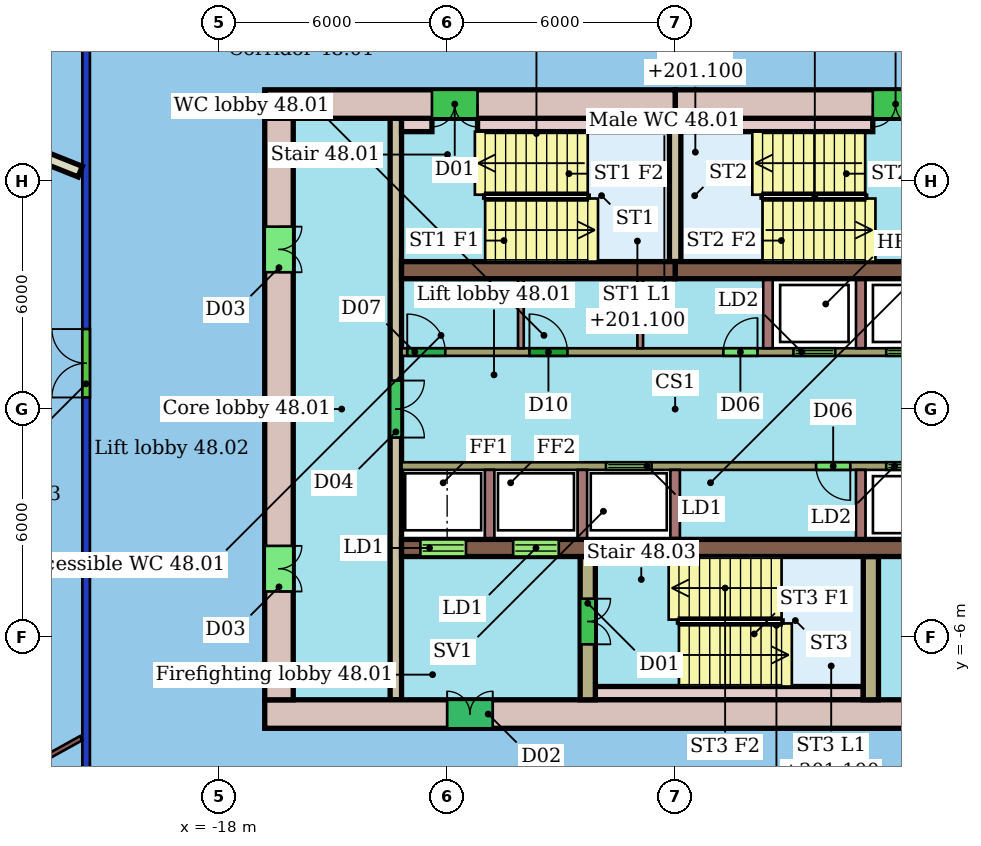
"""IFC4 building model, lengths in metres.
Left out: names, types, materials, properties, quantities, classifications, styles, units other than length and angle.
Written with IfcOpenShell. Run it as: python <this file> out.ifc"""

import sys

from ifc_helpers import new_model, si_unit, direction, frame, frame_2d, origin, place, context, subcontext, project, spatial, rectangle, extrude, element, fill, save


model = new_model("IFC4")
c1 = context("Model", 3, precision=1e-05, world=origin(), true_north=direction((0.0, 1.0)))
c2 = subcontext(c1, "Body", "Model", "MODEL_VIEW")
j1 = project(units=[si_unit("LENGTHUNIT", "METRE"), si_unit("PLANEANGLEUNIT", "RADIAN")], contexts=[c1])
p1 = place(None, origin())
s1 = spatial("IfcSite", under=j1, at=p1, CompositionType="ELEMENT")
p2 = place(p1, origin())
s2 = spatial("IfcBuilding", under=s1, at=p2, CompositionType="ELEMENT")
p3 = place(p2, frame((0.0, 0.0, 199.3)))
s3 = spatial("IfcBuildingStorey", under=s2, at=p3, CompositionType="ELEMENT", Elevation=199.3)
p4 = place(p3, frame((-21.5, -10.4, 0.0), z_axis=(0.0, 0.0, 1.0), x_axis=(0.0, 1.0, 0.0)))
e1 = element("IfcWall", 1, at=p4, inside=s3, PredefinedType="PARTITIONING", context=c2, shape_type="SweptSolid", body=[
    extrude(rectangle(XDim=20.8, YDim=0.2, at=frame_2d((10.4, 0.0))), origin(), (0.0, 0.0, 1.0), 3.05),
])
p5 = place(p4, frame((10.705, 0.0, 0.0)))
e2 = element("IfcOpeningElement", 2, at=p5, cuts=e1, PredefinedType="OPENING", context=c2, shape_type="SweptSolid", body=[
    extrude(rectangle(XDim=1.8, YDim=2.4, at=frame_2d((0.9, 1.2))), frame((0.0, 0.11, 0.0), z_axis=(0.0, -1.0, 0.0), x_axis=(1.0, 0.0, 0.0)), (0.0, 0.0, 1.0), 0.22),
])
p6 = place(p3, frame((-27.328, 8.511, 0.0), z_axis=(0.0, 0.0, 1.0), x_axis=(0.928768643744, -0.370659960608, 0.0)))
e3 = element("IfcWall", 3, at=p6, inside=s3, PredefinedType="PARTITIONING", context=c2, shape_type="SweptSolid", body=[
    extrude(rectangle(XDim=6.107, YDim=0.3, at=frame_2d((3.054, 0.0))), origin(), (0.0, 0.0, 1.0), 3.45),
])
p7 = place(p3, frame((-29.476, -13.006, 0.0), z_axis=(0.0, 0.0, 1.0), x_axis=(0.874733135583, 0.484604933439, 0.0)))
e4 = element("IfcWall", 4, at=p7, inside=s3, PredefinedType="PARTITIONING", context=c2, shape_type="SweptSolid", body=[
    extrude(rectangle(XDim=8.969, YDim=0.125, at=frame_2d((4.485, 0.0))), origin(), (0.0, 0.0, 1.0), 3.45),
])
p8 = place(p3, frame((4.8, 8.025, 0.0), z_axis=(0.0, 0.0, 1.0), x_axis=(-1.0, 0.0, 0.0)))
e5 = element("IfcWall", 5, at=p8, inside=s3, PredefinedType="SHEAR", context=c2, shape_type="SweptSolid", body=[
    extrude(rectangle(XDim=10.8, YDim=0.75, at=frame_2d((5.4, 0.0))), origin(), (0.0, 0.0, 1.0), 3.3),
])
p9 = place(p8, frame((4.4, 0.0, 0.0)))
e6 = element("IfcOpeningElement", 6, at=p9, cuts=e5, PredefinedType="OPENING", context=c2, shape_type="SweptSolid", body=[
    extrude(rectangle(XDim=1.2, YDim=2.1, at=frame_2d((0.6, 1.05))), frame((0.0, 0.385, 0.0), z_axis=(0.0, -1.0, 0.0), x_axis=(1.0, 0.0, 0.0)), (0.0, 0.0, 1.0), 0.77),
])
p10 = place(p3, frame((-6.0, 8.025, 0.0), z_axis=(0.0, 0.0, 1.0), x_axis=(-1.0, 0.0, 0.0)))
e7 = element("IfcWall", 7, at=p10, inside=s3, PredefinedType="SHEAR", context=c2, shape_type="SweptSolid", body=[
    extrude(rectangle(XDim=10.8, YDim=0.75, at=frame_2d((5.4, 0.0))), origin(), (0.0, 0.0, 1.0), 3.3),
])
p11 = place(p10, frame((5.2, 0.0, 0.0)))
e8 = element("IfcOpeningElement", 8, at=p11, cuts=e7, PredefinedType="OPENING", context=c2, shape_type="SweptSolid", body=[
    extrude(rectangle(XDim=1.2, YDim=2.1, at=frame_2d((0.6, 1.05))), frame((0.0, 0.385, 0.0), z_axis=(0.0, -1.0, 0.0), x_axis=(1.0, 0.0, 0.0)), (0.0, 0.0, 1.0), 0.77),
])
p12 = place(p3, frame((-16.8, -8.025, 0.0), z_axis=(0.0, 0.0, 1.0), x_axis=(1.0, 0.0, 0.0)))
e9 = element("IfcWall", 9, at=p12, inside=s3, PredefinedType="SHEAR", context=c2, shape_type="SweptSolid", body=[
    extrude(rectangle(XDim=21.6, YDim=0.75, at=frame_2d((10.8, 0.0))), origin(), (0.0, 0.0, 1.0), 3.3),
])
p13 = place(p12, frame((4.8, 0.0, 0.0)))
e10 = element("IfcOpeningElement", 10, at=p13, cuts=e9, PredefinedType="OPENING", context=c2, shape_type="SweptSolid", body=[
    extrude(rectangle(XDim=1.2, YDim=2.1, at=frame_2d((0.6, 1.05))), frame((0.0, 0.385, 0.0), z_axis=(0.0, -1.0, 0.0), x_axis=(1.0, 0.0, 0.0)), (0.0, 0.0, 1.0), 0.77),
])
p14 = place(p3, frame((-16.425, 7.65, 0.0), z_axis=(0.0, 0.0, 1.0), x_axis=(0.0, -1.0, 0.0)))
e11 = element("IfcWall", 11, at=p14, inside=s3, PredefinedType="SHEAR", context=c2, shape_type="SweptSolid", body=[
    extrude(rectangle(XDim=15.3, YDim=0.75, at=frame_2d((7.65, 0.0))), origin(), (0.0, 0.0, 1.0), 3.3),
])
p15 = place(p14, frame((11.25, 0.0, 0.0)))
e12 = element("IfcOpeningElement", 12, at=p15, cuts=e11, PredefinedType="OPENING", context=c2, shape_type="SweptSolid", body=[
    extrude(rectangle(XDim=1.2, YDim=2.1, at=frame_2d((0.6, 1.05))), frame((0.0, 0.385, 0.0), z_axis=(0.0, -1.0, 0.0), x_axis=(1.0, 0.0, 0.0)), (0.0, 0.0, 1.0), 0.77),
])
p16 = place(p14, frame((2.85, 0.0, 0.0)))
e13 = element("IfcOpeningElement", 13, at=p16, cuts=e11, PredefinedType="OPENING", context=c2, shape_type="SweptSolid", body=[
    extrude(rectangle(XDim=1.2, YDim=2.1, at=frame_2d((0.6, 1.05))), frame((0.0, 0.385, 0.0), z_axis=(0.0, -1.0, 0.0), x_axis=(1.0, 0.0, 0.0)), (0.0, 0.0, 1.0), 0.77),
])
for number, where, z_axis, x_axis in (
    (14, (-13.2, 3.655, 0.0), (0.0, 0.0, 1.0), (1.0, 0.0, 0.0)),
    (15, (-6.0, 3.655, 0.0), (0.0, 0.0, 1.0), (1.0, 0.0, 0.0)),
):
    element("IfcWall", number, at=place(p3, frame(where, z_axis=z_axis, x_axis=x_axis)), inside=s3, PredefinedType="SHEAR", context=c2, shape_type="SweptSolid", body=[
        extrude(rectangle(XDim=7.2, YDim=0.45, at=frame_2d((3.6, 0.0))), origin(), (0.0, 0.0, 1.0), 3.3),
    ])
p17 = place(p3, frame((-13.2, -3.655, 0.0), z_axis=(0.0, 0.0, 1.0), x_axis=(1.0, 0.0, 0.0)))
e16 = element("IfcWall", 16, at=p17, inside=s3, PredefinedType="SHEAR", context=c2, shape_type="SweptSolid", body=[
    extrude(rectangle(XDim=7.2, YDim=0.45, at=frame_2d((3.6, 0.0))), origin(), (0.0, 0.0, 1.0), 3.3),
])
p18 = place(p17, frame((0.496, 0.0, 0.0)))
e17 = element("IfcOpeningElement", 17, at=p18, cuts=e16, PredefinedType="OPENING", context=c2, shape_type="SweptSolid", body=[
    extrude(rectangle(XDim=1.2, YDim=2.1, at=frame_2d((0.6, 1.05))), frame((0.0, 0.235, 0.0), z_axis=(0.0, -1.0, 0.0), x_axis=(1.0, 0.0, 0.0)), (0.0, 0.0, 1.0), 0.47),
])
p19 = place(p17, frame((2.938, 0.0, 0.0)))
e18 = element("IfcOpeningElement", 18, at=p19, cuts=e16, PredefinedType="OPENING", context=c2, shape_type="SweptSolid", body=[
    extrude(rectangle(XDim=1.2, YDim=2.1, at=frame_2d((0.6, 1.05))), frame((0.0, 0.235, 0.0), z_axis=(0.0, -1.0, 0.0), x_axis=(1.0, 0.0, 0.0)), (0.0, 0.0, 1.0), 0.47),
])
p20 = place(p3, frame((-6.0, -3.655, 0.0), z_axis=(0.0, 0.0, 1.0), x_axis=(1.0, 0.0, 0.0)))
e19 = element("IfcWall", 19, at=p20, inside=s3, PredefinedType="SHEAR", context=c2, shape_type="SweptSolid", body=[
    extrude(rectangle(XDim=7.2, YDim=0.45, at=frame_2d((3.6, 0.0))), origin(), (0.0, 0.0, 1.0), 3.3),
])
p21 = place(p3, frame((-13.35, 7.65, 0.0), z_axis=(0.0, 0.0, 1.0), x_axis=(0.0, -1.0, 0.0)))
e20 = element("IfcWall", 20, at=p21, inside=s3, PredefinedType="SHEAR", context=c2, shape_type="SweptSolid", body=[
    extrude(rectangle(XDim=15.3, YDim=0.3, at=frame_2d((7.65, 0.0))), origin(), (0.0, 0.0, 1.0), 3.3),
])
p22 = place(p21, frame((6.9, 0.0, 0.0)))
e21 = element("IfcOpeningElement", 21, at=p22, cuts=e20, PredefinedType="OPENING", context=c2, shape_type="SweptSolid", body=[
    extrude(rectangle(XDim=1.5, YDim=2.1, at=frame_2d((0.75, 1.05))), frame((0.0, 0.16, 0.0), z_axis=(0.0, -1.0, 0.0), x_axis=(1.0, 0.0, 0.0)), (0.0, 0.0, 1.0), 0.32),
])
p23 = place(p3, frame((-13.2, 1.5, 0.0), z_axis=(0.0, 0.0, 1.0), x_axis=(1.0, 0.0, 0.0)))
e22 = element("IfcWall", 22, at=p23, inside=s3, PredefinedType="SHEAR", context=c2, shape_type="SweptSolid", body=[
    extrude(rectangle(XDim=14.4, YDim=0.2, at=frame_2d((7.2, 0.0))), origin(), (0.0, 0.0, 1.0), 3.3),
])
p24 = place(p23, frame((10.312, 0.0, 0.0)))
e23 = element("IfcOpeningElement", 23, at=p24, cuts=e22, PredefinedType="OPENING", context=c2, shape_type="SweptSolid", body=[
    extrude(rectangle(XDim=1.1, YDim=2.1, at=frame_2d((0.55, 1.05))), frame((0.0, 0.11, 0.0), z_axis=(0.0, -1.0, 0.0), x_axis=(1.0, 0.0, 0.0)), (0.0, 0.0, 1.0), 0.22),
])
p25 = place(p23, frame((12.754, 0.0, 0.0)))
e24 = element("IfcOpeningElement", 24, at=p25, cuts=e22, PredefinedType="OPENING", context=c2, shape_type="SweptSolid", body=[
    extrude(rectangle(XDim=1.1, YDim=2.1, at=frame_2d((0.55, 1.05))), frame((0.0, 0.11, 0.0), z_axis=(0.0, -1.0, 0.0), x_axis=(1.0, 0.0, 0.0)), (0.0, 0.0, 1.0), 0.22),
])
p26 = place(p23, frame((0.15, 0.0, 0.0)))
e25 = element("IfcOpeningElement", 25, at=p26, cuts=e22, PredefinedType="OPENING", context=c2, shape_type="SweptSolid", body=[
    extrude(rectangle(XDim=1.0, YDim=2.1, at=frame_2d((0.5, 1.05))), frame((0.0, 0.11, 0.0), z_axis=(0.0, -1.0, 0.0), x_axis=(1.0, 0.0, 0.0)), (0.0, 0.0, 1.0), 0.22),
])
p27 = place(p23, frame((3.365, 0.0, 0.0)))
e26 = element("IfcOpeningElement", 26, at=p27, cuts=e22, PredefinedType="OPENING", context=c2, shape_type="SweptSolid", body=[
    extrude(rectangle(XDim=1.0, YDim=2.1, at=frame_2d((0.5, 1.05))), frame((0.0, 0.11, 0.0), z_axis=(0.0, -1.0, 0.0), x_axis=(1.0, 0.0, 0.0)), (0.0, 0.0, 1.0), 0.22),
])
p28 = place(p23, frame((8.467, 0.0, 0.0)))
e27 = element("IfcOpeningElement", 27, at=p28, cuts=e22, PredefinedType="OPENING", context=c2, shape_type="SweptSolid", body=[
    extrude(rectangle(XDim=0.9, YDim=2.1, at=frame_2d((0.45, 1.05))), frame((0.0, 0.11, 0.0), z_axis=(0.0, -1.0, 0.0), x_axis=(1.0, 0.0, 0.0)), (0.0, 0.0, 1.0), 0.22),
])
p29 = place(p3, frame((1.2, -1.5, 0.0), z_axis=(0.0, 0.0, 1.0), x_axis=(-1.0, 0.0, 0.0)))
e28 = element("IfcWall", 28, at=p29, inside=s3, PredefinedType="SHEAR", context=c2, shape_type="SweptSolid", body=[
    extrude(rectangle(XDim=14.4, YDim=0.2, at=frame_2d((7.2, 0.0))), origin(), (0.0, 0.0, 1.0), 3.3),
])
p30 = place(p29, frame((7.821, 0.0, 0.0)))
e29 = element("IfcOpeningElement", 29, at=p30, cuts=e28, PredefinedType="OPENING", context=c2, shape_type="SweptSolid", body=[
    extrude(rectangle(XDim=1.2, YDim=2.1, at=frame_2d((0.6, 1.05))), frame((0.0, 0.11, 0.0), z_axis=(0.0, -1.0, 0.0), x_axis=(1.0, 0.0, 0.0)), (0.0, 0.0, 1.0), 0.22),
])
p31 = place(p29, frame((0.546, 0.0, 0.0)))
e30 = element("IfcOpeningElement", 30, at=p31, cuts=e28, PredefinedType="OPENING", context=c2, shape_type="SweptSolid", body=[
    extrude(rectangle(XDim=1.1, YDim=2.1, at=frame_2d((0.55, 1.05))), frame((0.0, 0.11, 0.0), z_axis=(0.0, -1.0, 0.0), x_axis=(1.0, 0.0, 0.0)), (0.0, 0.0, 1.0), 0.22),
])
p32 = place(p29, frame((2.592, 0.0, 0.0)))
e31 = element("IfcOpeningElement", 31, at=p32, cuts=e28, PredefinedType="OPENING", context=c2, shape_type="SweptSolid", body=[
    extrude(rectangle(XDim=0.9, YDim=2.1, at=frame_2d((0.45, 1.05))), frame((0.0, 0.11, 0.0), z_axis=(0.0, -1.0, 0.0), x_axis=(1.0, 0.0, 0.0)), (0.0, 0.0, 1.0), 0.22),
])
p33 = place(p3, frame((-8.3, -3.88, 0.0), z_axis=(0.0, 0.0, 1.0), x_axis=(0.0, -1.0, 0.0)))
e32 = element("IfcWall", 32, at=p33, inside=s3, PredefinedType="SHEAR", context=c2, shape_type="SweptSolid", body=[
    extrude(rectangle(XDim=3.77, YDim=0.4, at=frame_2d((1.885, 0.0))), origin(), (0.0, 0.0, 1.0), 3.3),
])
p34 = place(p33, frame((1.11, 0.0, 0.0)))
e33 = element("IfcOpeningElement", 33, at=p34, cuts=e32, PredefinedType="OPENING", context=c2, shape_type="SweptSolid", body=[
    extrude(rectangle(XDim=1.2, YDim=2.1, at=frame_2d((0.6, 1.05))), frame((0.0, 0.21, 0.0), z_axis=(0.0, -1.0, 0.0), x_axis=(1.0, 0.0, 0.0)), (0.0, 0.0, 1.0), 0.42),
])
p35 = place(p3, frame((-0.85, -3.88, 0.0), z_axis=(0.0, 0.0, 1.0), x_axis=(0.0, -1.0, 0.0)))
e34 = element("IfcWall", 34, at=p35, inside=s3, PredefinedType="SHEAR", context=c2, shape_type="SweptSolid", body=[
    extrude(rectangle(XDim=3.77, YDim=0.4, at=frame_2d((1.885, 0.0))), origin(), (0.0, 0.0, 1.0), 3.3),
])
p36 = place(p3, frame((-6.0, 3.88, 0.0), z_axis=(0.0, 0.0, 1.0), x_axis=(0.0, 1.0, 0.0)))
e35 = element("IfcWall", 35, at=p36, inside=s3, PredefinedType="SHEAR", context=c2, shape_type="SweptSolid", body=[
    extrude(rectangle(XDim=3.77, YDim=0.3, at=frame_2d((1.885, 0.0))), origin(), (0.0, 0.0, 1.0), 3.3),
])
p37 = place(p3, frame((-13.2, 7.475, 0.0), z_axis=(0.0, 0.0, 1.0), x_axis=(1.0, 0.0, 0.0)))
e36 = element("IfcWall", 36, at=p37, inside=s3, PredefinedType="SHEAR", context=c2, shape_type="SweptSolid", body=[
    extrude(rectangle(XDim=0.8, YDim=0.35, at=frame_2d((0.4, 0.0))), origin(), (0.0, 0.0, 1.0), 3.3),
])
for number, where, z_axis, x_axis in (
    (37, (-11.2, 7.475, 0.0), (0.0, 0.0, 1.0), (1.0, 0.0, 0.0)),
    (38, (-5.85, 7.475, 0.0), (0.0, 0.0, 1.0), (1.0, 0.0, 0.0)),
):
    element("IfcWall", number, at=place(p3, frame(where, z_axis=z_axis, x_axis=x_axis)), inside=s3, PredefinedType="SHEAR", context=c2, shape_type="SweptSolid", body=[
        extrude(rectangle(XDim=5.05, YDim=0.35, at=frame_2d((2.525, 0.0))), origin(), (0.0, 0.0, 1.0), 3.3),
    ])
p38 = place(p3, frame((-8.1, -7.475, 0.0), z_axis=(0.0, 0.0, 1.0), x_axis=(1.0, 0.0, 0.0)))
e39 = element("IfcWall", 39, at=p38, inside=s3, PredefinedType="SHEAR", context=c2, shape_type="SweptSolid", body=[
    extrude(rectangle(XDim=7.05, YDim=0.35, at=frame_2d((3.525, 0.0))), origin(), (0.0, 0.0, 1.0), 3.3),
])
for number, where, z_axis, x_axis in (
    (40, (-3.558, 1.6, 0.0), (0.0, 0.0, 1.0), (0.0, 1.0, 0.0)),
    (41, (-1.117, 1.6, 0.0), (0.0, 0.0, 1.0), (0.0, 1.0, 0.0)),
):
    element("IfcWall", number, at=place(p3, frame(where, z_axis=z_axis, x_axis=x_axis)), inside=s3, PredefinedType="SHEAR", context=c2, shape_type="SweptSolid", body=[
        extrude(rectangle(XDim=1.83, YDim=0.25, at=frame_2d((0.915, 0.0))), origin(), (0.0, 0.0, 1.0), 3.3),
    ])
for number, where, z_axis, x_axis in (
    (42, (-10.06, 1.6, 0.0), (0.0, 0.0, 1.0), (0.0, 1.0, 0.0)),
    (43, (-6.919, 1.6, 0.0), (0.0, 0.0, 1.0), (0.0, 1.0, 0.0)),
):
    element("IfcWall", number, at=place(p3, frame(where, z_axis=z_axis, x_axis=x_axis)), inside=s3, PredefinedType="PARTITIONING", context=c2, shape_type="SweptSolid", body=[
        extrude(rectangle(XDim=1.83, YDim=0.15, at=frame_2d((0.915, 0.0))), origin(), (0.0, 0.0, 1.0), 3.3),
    ])
for number, where, z_axis, x_axis in (
    (44, (-10.883, -1.6, 0.0), (0.0, 0.0, 1.0), (0.0, -1.0, 0.0)),
    (45, (-8.442, -1.6, 0.0), (0.0, 0.0, 1.0), (0.0, -1.0, 0.0)),
    (46, (-6.0, -1.6, 0.0), (0.0, 0.0, 1.0), (0.0, -1.0, 0.0)),
    (47, (-1.117, -1.6, 0.0), (0.0, 0.0, 1.0), (0.0, -1.0, 0.0)),
):
    element("IfcWall", number, at=place(p3, frame(where, z_axis=z_axis, x_axis=x_axis)), inside=s3, PredefinedType="SHEAR", context=c2, shape_type="SweptSolid", body=[
        extrude(rectangle(XDim=1.83, YDim=0.25, at=frame_2d((0.915, 0.0))), origin(), (0.0, 0.0, 1.0), 3.3),
    ])
p39 = place(p5, origin())
e48 = element("IfcDoor", 48, at=p39, inside=s3, OperationType="DOUBLE_DOOR_SINGLE_SWING", PredefinedType="DOOR", context=c2, shape_type="SweptSolid", body=[
    extrude(rectangle(XDim=1.8, YDim=2.4, at=frame_2d((0.9, 1.2))), frame((0.0, 0.025, 0.0), z_axis=(0.0, -1.0, 0.0), x_axis=(1.0, 0.0, 0.0)), (0.0, 0.0, 1.0), 0.05),
])
fill(e2, e48)
p40 = place(p9, origin())
e49 = element("IfcDoor", 49, at=p40, inside=s3, OperationType="DOUBLE_DOOR_SINGLE_SWING", PredefinedType="NOTDEFINED", context=c2, shape_type="SweptSolid", body=[
    extrude(rectangle(XDim=1.2, YDim=2.1, at=frame_2d((0.6, 1.05))), frame((0.0, 0.025, 0.0), z_axis=(0.0, -1.0, 0.0), x_axis=(1.0, 0.0, 0.0)), (0.0, 0.0, 1.0), 0.05),
])
fill(e6, e49)
p41 = place(p11, origin())
e50 = element("IfcDoor", 50, at=p41, inside=s3, OperationType="DOUBLE_DOOR_SINGLE_SWING", PredefinedType="NOTDEFINED", context=c2, shape_type="SweptSolid", body=[
    extrude(rectangle(XDim=1.2, YDim=2.1, at=frame_2d((0.6, 1.05))), frame((0.0, 0.025, 0.0), z_axis=(0.0, -1.0, 0.0), x_axis=(1.0, 0.0, 0.0)), (0.0, 0.0, 1.0), 0.05),
])
fill(e8, e50)
p42 = place(p13, origin())
e51 = element("IfcDoor", 51, at=p42, inside=s3, OperationType="DOUBLE_DOOR_SINGLE_SWING", PredefinedType="NOTDEFINED", context=c2, shape_type="SweptSolid", body=[
    extrude(rectangle(XDim=1.2, YDim=2.1, at=frame_2d((0.6, 1.05))), frame((0.0, 0.025, 0.0), z_axis=(0.0, -1.0, 0.0), x_axis=(1.0, 0.0, 0.0)), (0.0, 0.0, 1.0), 0.05),
])
fill(e10, e51)
p43 = place(p15, origin())
e52 = element("IfcDoor", 52, at=p43, inside=s3, OperationType="DOUBLE_DOOR_SINGLE_SWING", PredefinedType="NOTDEFINED", context=c2, shape_type="SweptSolid", body=[
    extrude(rectangle(XDim=1.2, YDim=2.1, at=frame_2d((0.6, 1.05))), frame((0.0, 0.025, 0.0), z_axis=(0.0, -1.0, 0.0), x_axis=(1.0, 0.0, 0.0)), (0.0, 0.0, 1.0), 0.05),
])
fill(e12, e52)
p44 = place(p16, origin())
e53 = element("IfcDoor", 53, at=p44, inside=s3, OperationType="DOUBLE_DOOR_SINGLE_SWING", PredefinedType="NOTDEFINED", context=c2, shape_type="SweptSolid", body=[
    extrude(rectangle(XDim=1.2, YDim=2.1, at=frame_2d((0.6, 1.05))), frame((0.0, 0.025, 0.0), z_axis=(0.0, -1.0, 0.0), x_axis=(1.0, 0.0, 0.0)), (0.0, 0.0, 1.0), 0.05),
])
fill(e13, e53)
p45 = place(p18, origin())
e54 = element("IfcDoor", 54, at=p45, inside=s3, OperationType="DOUBLE_DOOR_SLIDING", PredefinedType="NOTDEFINED", context=c2, shape_type="SweptSolid", body=[
    extrude(rectangle(XDim=1.2, YDim=2.1, at=frame_2d((0.6, 1.05))), frame((0.0, 0.025, 0.0), z_axis=(0.0, -1.0, 0.0), x_axis=(1.0, 0.0, 0.0)), (0.0, 0.0, 1.0), 0.05),
])
fill(e17, e54)
p46 = place(p19, origin())
e55 = element("IfcDoor", 55, at=p46, inside=s3, OperationType="DOUBLE_DOOR_SLIDING", PredefinedType="NOTDEFINED", context=c2, shape_type="SweptSolid", body=[
    extrude(rectangle(XDim=1.2, YDim=2.1, at=frame_2d((0.6, 1.05))), frame((0.0, 0.025, 0.0), z_axis=(0.0, -1.0, 0.0), x_axis=(1.0, 0.0, 0.0)), (0.0, 0.0, 1.0), 0.05),
])
fill(e18, e55)
p47 = place(p22, origin())
e56 = element("IfcDoor", 56, at=p47, inside=s3, OperationType="DOUBLE_DOOR_SINGLE_SWING", PredefinedType="NOTDEFINED", context=c2, shape_type="SweptSolid", body=[
    extrude(rectangle(XDim=1.5, YDim=2.1, at=frame_2d((0.75, 1.05))), frame((0.0, 0.025, 0.0), z_axis=(0.0, -1.0, 0.0), x_axis=(1.0, 0.0, 0.0)), (0.0, 0.0, 1.0), 0.05),
])
fill(e21, e56)
p48 = place(p24, origin())
e57 = element("IfcDoor", 57, at=p48, inside=s3, OperationType="DOUBLE_DOOR_SLIDING", PredefinedType="NOTDEFINED", context=c2, shape_type="SweptSolid", body=[
    extrude(rectangle(XDim=1.1, YDim=2.1, at=frame_2d((0.55, 1.05))), frame((0.0, 0.025, 0.0), z_axis=(0.0, -1.0, 0.0), x_axis=(1.0, 0.0, 0.0)), (0.0, 0.0, 1.0), 0.05),
])
fill(e23, e57)
p49 = place(p25, origin())
e58 = element("IfcDoor", 58, at=p49, inside=s3, OperationType="DOUBLE_DOOR_SLIDING", PredefinedType="NOTDEFINED", context=c2, shape_type="SweptSolid", body=[
    extrude(rectangle(XDim=1.1, YDim=2.1, at=frame_2d((0.55, 1.05))), frame((0.0, 0.025, 0.0), z_axis=(0.0, -1.0, 0.0), x_axis=(1.0, 0.0, 0.0)), (0.0, 0.0, 1.0), 0.05),
])
fill(e24, e58)
p50 = place(p26, origin())
e59 = element("IfcDoor", 59, at=p50, inside=s3, OperationType="SINGLE_SWING_LEFT", PredefinedType="NOTDEFINED", context=c2, shape_type="SweptSolid", body=[
    extrude(rectangle(XDim=1.0, YDim=2.1, at=frame_2d((0.5, 1.05))), frame((0.0, 0.025, 0.0), z_axis=(0.0, -1.0, 0.0), x_axis=(1.0, 0.0, 0.0)), (0.0, 0.0, 1.0), 0.05),
])
fill(e25, e59)
p51 = place(p27, origin())
e60 = element("IfcDoor", 60, at=p51, inside=s3, OperationType="SINGLE_SWING_LEFT", PredefinedType="NOTDEFINED", context=c2, shape_type="SweptSolid", body=[
    extrude(rectangle(XDim=1.0, YDim=2.1, at=frame_2d((0.5, 1.05))), frame((0.0, 0.025, 0.0), z_axis=(0.0, -1.0, 0.0), x_axis=(1.0, 0.0, 0.0)), (0.0, 0.0, 1.0), 0.05),
])
fill(e26, e60)
p52 = place(p28, origin())
e61 = element("IfcDoor", 61, at=p52, inside=s3, OperationType="SINGLE_SWING_RIGHT", PredefinedType="NOTDEFINED", context=c2, shape_type="SweptSolid", body=[
    extrude(rectangle(XDim=0.9, YDim=2.1, at=frame_2d((0.45, 1.05))), frame((0.0, 0.025, 0.0), z_axis=(0.0, -1.0, 0.0), x_axis=(1.0, 0.0, 0.0)), (0.0, 0.0, 1.0), 0.05),
])
fill(e27, e61)
p53 = place(p30, origin())
e62 = element("IfcDoor", 62, at=p53, inside=s3, OperationType="DOUBLE_DOOR_SLIDING", PredefinedType="NOTDEFINED", context=c2, shape_type="SweptSolid", body=[
    extrude(rectangle(XDim=1.2, YDim=2.1, at=frame_2d((0.6, 1.05))), frame((0.0, 0.025, 0.0), z_axis=(0.0, -1.0, 0.0), x_axis=(1.0, 0.0, 0.0)), (0.0, 0.0, 1.0), 0.05),
])
fill(e29, e62)
p54 = place(p31, origin())
e63 = element("IfcDoor", 63, at=p54, inside=s3, OperationType="DOUBLE_DOOR_SLIDING", PredefinedType="NOTDEFINED", context=c2, shape_type="SweptSolid", body=[
    extrude(rectangle(XDim=1.1, YDim=2.1, at=frame_2d((0.55, 1.05))), frame((0.0, 0.025, 0.0), z_axis=(0.0, -1.0, 0.0), x_axis=(1.0, 0.0, 0.0)), (0.0, 0.0, 1.0), 0.05),
])
fill(e30, e63)
p55 = place(p32, origin())
e64 = element("IfcDoor", 64, at=p55, inside=s3, OperationType="SINGLE_SWING_LEFT", PredefinedType="NOTDEFINED", context=c2, shape_type="SweptSolid", body=[
    extrude(rectangle(XDim=0.9, YDim=2.1, at=frame_2d((0.45, 1.05))), frame((0.0, 0.025, 0.0), z_axis=(0.0, -1.0, 0.0), x_axis=(1.0, 0.0, 0.0)), (0.0, 0.0, 1.0), 0.05),
])
fill(e31, e64)
p56 = place(p34, origin())
e65 = element("IfcDoor", 65, at=p56, inside=s3, OperationType="DOUBLE_DOOR_SINGLE_SWING", PredefinedType="NOTDEFINED", context=c2, shape_type="SweptSolid", body=[
    extrude(rectangle(XDim=1.2, YDim=2.1, at=frame_2d((0.6, 1.05))), frame((0.0, 0.025, 0.0), z_axis=(0.0, -1.0, 0.0), x_axis=(1.0, 0.0, 0.0)), (0.0, 0.0, 1.0), 0.05),
])
fill(e33, e65)
save(model, sys.argv[1])
